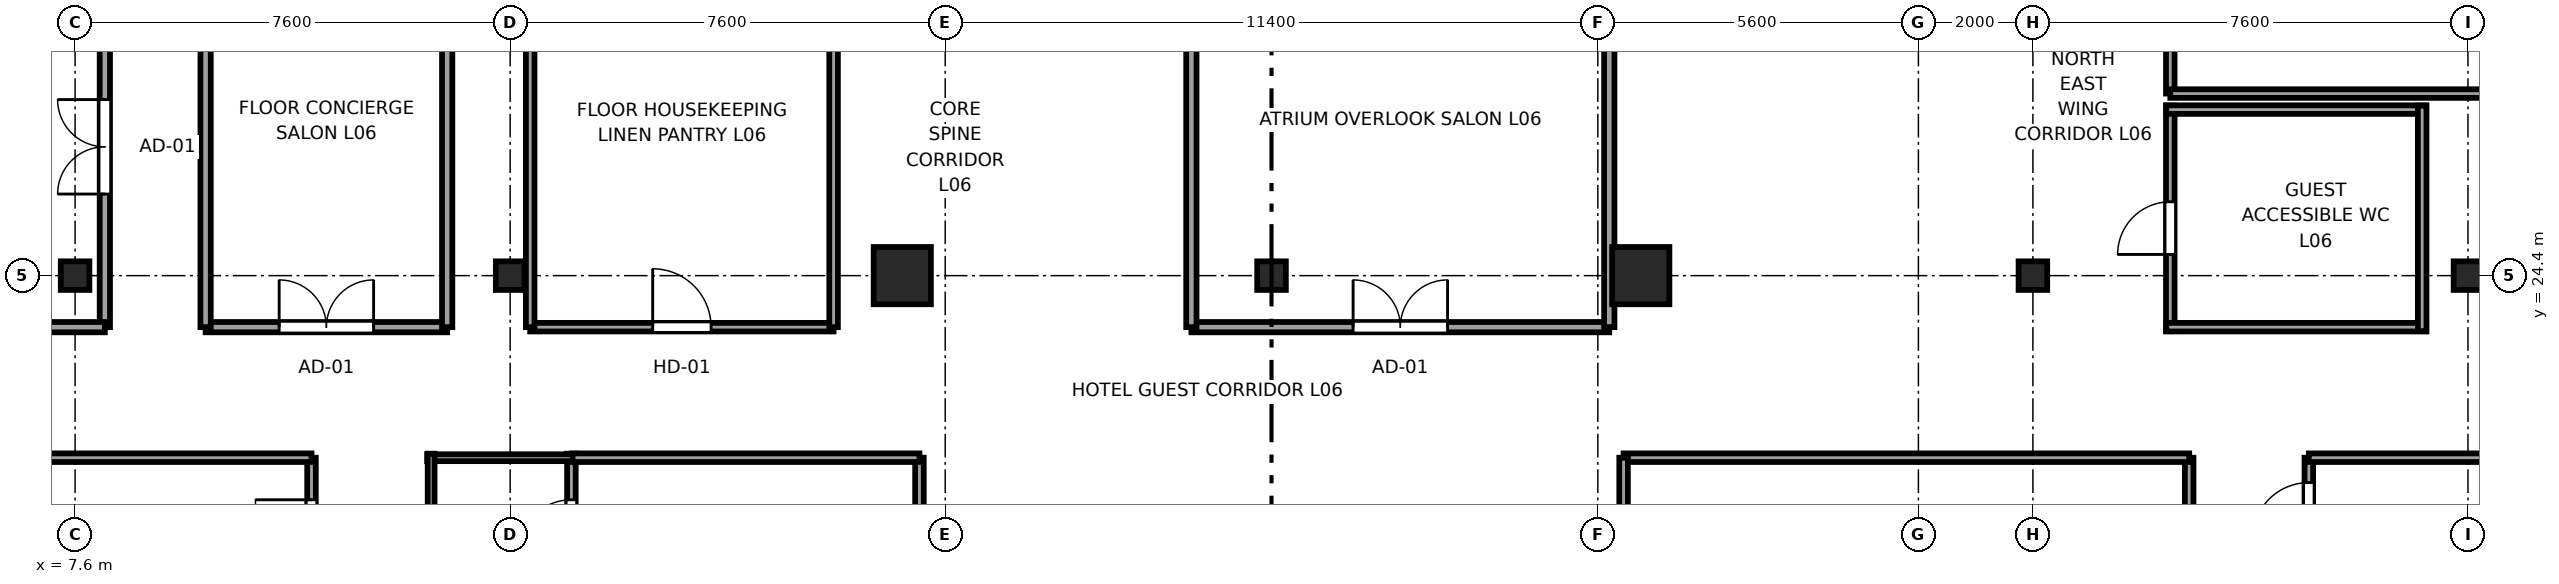
"""IFC4 building model, lengths in metres.
Left out: names, types, materials, properties, quantities, classifications, styles, units other than length and angle.
Written with IfcOpenShell. Run it as: python <this file> out.ifc"""

import sys

from ifc_helpers import new_model, si_unit, direction, frame, frame_2d, origin, origin_2d, place, context, subcontext, project, spatial, rectangle, i_section, extrude, source, transform, mapped, element, fill, save


model = new_model("IFC4")
c1 = context("Model", 3, precision=1e-05, world=origin(), true_north=direction((0.0, 1.0)))
c2 = subcontext(c1, "Body", "Model", "MODEL_VIEW")
j1 = project(units=[si_unit("LENGTHUNIT", "METRE"), si_unit("PLANEANGLEUNIT", "RADIAN")], contexts=[c1])
p1 = place(None, origin())
s1 = spatial("IfcSite", under=j1, at=p1, CompositionType="ELEMENT")
p2 = place(p1, origin())
s2 = spatial("IfcBuilding", under=s1, at=p2, CompositionType="ELEMENT")
p3 = place(p2, frame((0.0, 0.0, 32.0)))
s3 = spatial("IfcBuildingStorey", under=s2, at=p3, CompositionType="ELEMENT", Elevation=32.0)
m1 = source(origin(), c2, "Body", "SweptSolid", [
    extrude(i_section(OverallWidth=0.5, OverallDepth=0.5, WebThickness=0.028, FlangeThickness=0.045, at=origin_2d()), origin(), (0.0, 0.0, 1.0), 3.55),
])
for number, where, z_axis, x_axis in (
    (1, (7.6, 24.4, 0.0), (0.0, 0.0, 1.0), (1.0, 0.0, 0.0)),
    (2, (15.2, 24.4, 0.0), (0.0, 0.0, 1.0), (1.0, 0.0, 0.0)),
):
    element("IfcColumn", number, at=place(p3, frame(where, z_axis=z_axis, x_axis=x_axis)), inside=s3, PredefinedType="COLUMN", context=c2, shape_type="MappedRepresentation", body=[
        mapped(m1, transform((0.0, 0.0, 0.0), x_axis=(1.0, 0.0, 0.0), y_axis=(0.0, 1.0, 0.0), z_axis=(0.0, 0.0, 1.0), scale=1.0)),
    ])
m2 = source(origin(), c2, "Body", "SweptSolid", [
    extrude(rectangle(XDim=1.0, YDim=1.0, at=origin_2d()), origin(), (0.0, 0.0, 1.0), 3.55),
])
for number, where, z_axis, x_axis in (
    (3, (22.05, 24.4, 0.0), (0.0, 0.0, 1.0), (1.0, 0.0, 0.0)),
    (4, (34.95, 24.4, 0.0), (0.0, 0.0, 1.0), (1.0, 0.0, 0.0)),
):
    element("IfcColumn", number, at=place(p3, frame(where, z_axis=z_axis, x_axis=x_axis)), inside=s3, PredefinedType="COLUMN", context=c2, shape_type="MappedRepresentation", body=[
        mapped(m2, transform((0.0, 0.0, 0.0), x_axis=(1.0, 0.0, 0.0), y_axis=(0.0, 1.0, 0.0), z_axis=(0.0, 0.0, 1.0), scale=1.0)),
    ])
for number, where, z_axis, x_axis in (
    (5, (41.8, 24.4, 0.0), (0.0, 0.0, 1.0), (1.0, 0.0, 0.0)),
    (6, (49.4, 24.4, 0.0), (0.0, 0.0, 1.0), (1.0, 0.0, 0.0)),
    (7, (28.5, 24.4, 0.0), (0.0, 0.0, 1.0), (1.0, 0.0, 0.0)),
):
    element("IfcColumn", number, at=place(p3, frame(where, z_axis=z_axis, x_axis=x_axis)), inside=s3, PredefinedType="COLUMN", context=c2, shape_type="MappedRepresentation", body=[
        mapped(m1, transform((0.0, 0.0, 0.0), x_axis=(1.0, 0.0, 0.0), y_axis=(0.0, 1.0, 0.0), z_axis=(0.0, 0.0, 1.0), scale=1.0)),
    ])
p4 = place(p3, frame((16.27, 18.9, 0.0), z_axis=(0.0, 0.0, 1.0), x_axis=(0.0, 1.0, 0.0)))
e8 = element("IfcWall", 8, at=p4, inside=s3, PredefinedType="PARTITIONING", context=c2, shape_type="SweptSolid", body=[
    extrude(rectangle(XDim=2.39, YDim=0.15, at=frame_2d((1.195, 0.0))), origin(), (0.0, 0.0, 1.0), 3.37),
])
p5 = place(p4, frame((0.665, 0.0, 0.0)))
e9 = element("IfcOpeningElement", 9, at=p5, cuts=e8, PredefinedType="OPENING", context=c2, shape_type="SweptSolid", body=[
    extrude(rectangle(XDim=0.92, YDim=2.01, at=frame_2d((0.46, 1.005))), frame((0.0, 0.085, 0.0), z_axis=(0.0, -1.0, 0.0), x_axis=(1.0, 0.0, 0.0)), (0.0, 0.0, 1.0), 0.17),
])
p6 = place(p3, frame((13.75, 21.22, 0.0), z_axis=(0.0, 0.0, 1.0), x_axis=(1.0, 0.0, 0.0)))
e10 = element("IfcWall", 10, at=p6, inside=s3, PredefinedType="PLUMBINGWALL", context=c2, shape_type="SweptSolid", body=[
    extrude(rectangle(XDim=2.59, YDim=0.12, at=frame_2d((1.295, 0.0))), origin(), (0.0, 0.0, 1.0), 3.37),
])
p7 = place(p3, frame((13.82, 18.9, 0.0), z_axis=(0.0, 0.0, 1.0), x_axis=(0.0, 1.0, 0.0)))
e11 = element("IfcWall", 11, at=p7, inside=s3, PredefinedType="PLUMBINGWALL", context=c2, shape_type="SweptSolid", body=[
    extrude(rectangle(XDim=2.39, YDim=0.12, at=frame_2d((1.195, 0.0))), origin(), (0.0, 0.0, 1.0), 3.37),
])
p8 = place(p3, frame((11.73, 18.81, 0.0), z_axis=(0.0, 0.0, 1.0), x_axis=(0.0, 1.0, 0.0)))
e12 = element("IfcWall", 12, at=p8, inside=s3, PredefinedType="PARTITIONING", context=c2, shape_type="SweptSolid", body=[
    extrude(rectangle(XDim=2.41, YDim=0.15, at=frame_2d((1.205, 0.0))), origin(), (0.0, 0.0, 1.0), 3.37),
])
p9 = place(p8, frame((0.695, 0.0, 0.0)))
e13 = element("IfcOpeningElement", 13, at=p9, cuts=e12, PredefinedType="OPENING", context=c2, shape_type="SweptSolid", body=[
    extrude(rectangle(XDim=0.98, YDim=2.12, at=frame_2d((0.49, 1.06))), frame((0.0, 0.085, 0.0), z_axis=(0.0, -1.0, 0.0), x_axis=(1.0, 0.0, 0.0)), (0.0, 0.0, 1.0), 0.17),
])
p10 = place(p3, frame((0.405, 21.22, 0.0), z_axis=(0.0, 0.0, 1.0), x_axis=(1.0, 0.0, 0.0)))
e14 = element("IfcWall", 14, at=p10, inside=s3, PredefinedType="PARTITIONING", context=c2, shape_type="SweptSolid", body=[
    extrude(rectangle(XDim=11.325, YDim=0.15, at=frame_2d((5.663, 0.0))), origin(), (0.0, 0.0, 1.0), 3.37),
])
p11 = place(p3, frame((22.35, 14.48, 0.0), z_axis=(0.0, 0.0, 1.0), x_axis=(0.0, 1.0, 0.0)))
e15 = element("IfcWall", 15, at=p11, inside=s3, PredefinedType="PARTITIONING", context=c2, shape_type="SweptSolid", body=[
    extrude(rectangle(XDim=6.74, YDim=0.15, at=frame_2d((3.37, 0.0))), origin(), (0.0, 0.0, 1.0), 3.37),
])
p12 = place(p3, frame((16.29, 21.22, 0.0), z_axis=(0.0, 0.0, 1.0), x_axis=(1.0, 0.0, 0.0)))
e16 = element("IfcWall", 16, at=p12, inside=s3, PredefinedType="PARTITIONING", context=c2, shape_type="SweptSolid", body=[
    extrude(rectangle(XDim=6.06, YDim=0.15, at=frame_2d((3.03, 0.0))), origin(), (0.0, 0.0, 1.0), 3.37),
])
p13 = place(p3, frame((44.53, 16.61, 0.0), z_axis=(0.0, 0.0, 1.0), x_axis=(0.0, 1.0, 0.0)))
e17 = element("IfcWall", 17, at=p13, inside=s3, PredefinedType="PARTITIONING", context=c2, shape_type="SweptSolid", body=[
    extrude(rectangle(XDim=4.61, YDim=0.15, at=frame_2d((2.305, 0.0))), origin(), (0.0, 0.0, 1.0), 3.37),
])
p14 = place(p13, frame((1.795, 0.0, 0.0)))
e18 = element("IfcOpeningElement", 18, at=p14, cuts=e17, PredefinedType="OPENING", context=c2, shape_type="SweptSolid", body=[
    extrude(rectangle(XDim=0.98, YDim=2.12, at=frame_2d((0.49, 1.06))), frame((0.0, 0.085, 0.0), z_axis=(0.0, -1.0, 0.0), x_axis=(1.0, 0.0, 0.0)), (0.0, 0.0, 1.0), 0.17),
])
p15 = place(p3, frame((34.65, 21.22, 0.0), z_axis=(0.0, 0.0, 1.0), x_axis=(1.0, 0.0, 0.0)))
e19 = element("IfcWall", 19, at=p15, inside=s3, PredefinedType="PARTITIONING", context=c2, shape_type="SweptSolid", body=[
    extrude(rectangle(XDim=9.88, YDim=0.15, at=frame_2d((4.94, 0.0))), origin(), (0.0, 0.0, 1.0), 3.37),
])
p16 = place(p3, frame((34.65, 14.28, 0.0), z_axis=(0.0, 0.0, 1.0), x_axis=(0.0, 1.0, 0.0)))
e20 = element("IfcWall", 20, at=p16, inside=s3, PredefinedType="PARTITIONING", context=c2, shape_type="SweptSolid", body=[
    extrude(rectangle(XDim=6.94, YDim=0.15, at=frame_2d((3.47, 0.0))), origin(), (0.0, 0.0, 1.0), 3.37),
])
p17 = place(p3, frame((46.62, 19.41, 0.0), z_axis=(0.0, 0.0, 1.0), x_axis=(0.0, 1.0, 0.0)))
e21 = element("IfcWall", 21, at=p17, inside=s3, PredefinedType="PARTITIONING", context=c2, shape_type="SweptSolid", body=[
    extrude(rectangle(XDim=1.81, YDim=0.15, at=frame_2d((0.905, 0.0))), origin(), (0.0, 0.0, 1.0), 3.37),
])
p18 = place(p17, frame((0.395, 0.0, 0.0)))
e22 = element("IfcOpeningElement", 22, at=p18, cuts=e21, PredefinedType="OPENING", context=c2, shape_type="SweptSolid", body=[
    extrude(rectangle(XDim=0.98, YDim=2.12, at=frame_2d((0.49, 1.06))), frame((0.0, 0.085, 0.0), z_axis=(0.0, -1.0, 0.0), x_axis=(1.0, 0.0, 0.0)), (0.0, 0.0, 1.0), 0.17),
])
p19 = place(p3, frame((46.62, 21.22, 0.0), z_axis=(0.0, 0.0, 1.0), x_axis=(1.0, 0.0, 0.0)))
e23 = element("IfcWall", 23, at=p19, inside=s3, PredefinedType="PARTITIONING", context=c2, shape_type="SweptSolid", body=[
    extrude(rectangle(XDim=9.975, YDim=0.15, at=frame_2d((4.987, 0.0))), origin(), (0.0, 0.0, 1.0), 3.37),
])
p20 = place(p3, frame((8.12, 23.5, 0.0), z_axis=(0.0, 0.0, 1.0), x_axis=(0.0, 1.0, 0.0)))
e24 = element("IfcWall", 24, at=p20, inside=s3, PredefinedType="PARTITIONING", context=c2, shape_type="SweptSolid", body=[
    extrude(rectangle(XDim=5.2, YDim=0.18, at=frame_2d((2.6, 0.0))), origin(), (0.0, 0.0, 1.0), 3.37),
])
p21 = place(p20, frame((2.325, 0.0, 0.0)))
e25 = element("IfcOpeningElement", 25, at=p21, cuts=e24, PredefinedType="OPENING", context=c2, shape_type="SweptSolid", body=[
    extrude(rectangle(XDim=1.65, YDim=2.15, at=frame_2d((0.825, 1.075))), frame((0.0, 0.1, 0.0), z_axis=(0.0, -1.0, 0.0), x_axis=(1.0, 0.0, 0.0)), (0.0, 0.0, 1.0), 0.2),
])
p22 = place(p3, frame((0.405, 23.5, 0.0), z_axis=(0.0, 0.0, 1.0), x_axis=(1.0, 0.0, 0.0)))
e26 = element("IfcWall", 26, at=p22, inside=s3, PredefinedType="PARTITIONING", context=c2, shape_type="SweptSolid", body=[
    extrude(rectangle(XDim=7.715, YDim=0.18, at=frame_2d((3.857, 0.0))), origin(), (0.0, 0.0, 1.0), 3.37),
])
p23 = place(p3, frame((44.2, 23.43, 0.0), z_axis=(0.0, 0.0, 1.0), x_axis=(0.0, 1.0, 0.0)))
e27 = element("IfcWall", 27, at=p23, inside=s3, PredefinedType="PARTITIONING", context=c2, shape_type="SweptSolid", body=[
    extrude(rectangle(XDim=3.94, YDim=0.15, at=frame_2d((1.97, 0.0))), origin(), (0.0, 0.0, 1.0), 3.37),
])
p24 = place(p23, frame((1.34, 0.0, 0.0)))
e28 = element("IfcOpeningElement", 28, at=p24, cuts=e27, PredefinedType="OPENING", context=c2, shape_type="SweptSolid", body=[
    extrude(rectangle(XDim=0.92, YDim=2.01, at=frame_2d((0.46, 1.005))), frame((0.0, 0.085, 0.0), z_axis=(0.0, -1.0, 0.0), x_axis=(1.0, 0.0, 0.0)), (0.0, 0.0, 1.0), 0.17),
])
for number, where, z_axis, x_axis in (
    (29, (44.13, 23.5, 0.0), (0.0, 0.0, 1.0), (1.0, 0.0, 0.0)),
    (30, (44.13, 27.3, 0.0), (0.0, 0.0, 1.0), (1.0, 0.0, 0.0)),
):
    element("IfcWall", number, at=place(p3, frame(where, z_axis=z_axis, x_axis=x_axis)), inside=s3, PredefinedType="PARTITIONING", context=c2, shape_type="SweptSolid", body=[
        extrude(rectangle(XDim=4.54, YDim=0.15, at=frame_2d((2.27, 0.0))), origin(), (0.0, 0.0, 1.0), 3.37),
    ])
p25 = place(p3, frame((48.6, 23.43, 0.0), z_axis=(0.0, 0.0, 1.0), x_axis=(0.0, 1.0, 0.0)))
e31 = element("IfcWall", 31, at=p25, inside=s3, PredefinedType="PARTITIONING", context=c2, shape_type="SweptSolid", body=[
    extrude(rectangle(XDim=3.94, YDim=0.15, at=frame_2d((1.97, 0.0))), origin(), (0.0, 0.0, 1.0), 3.37),
])
p26 = place(p3, frame((44.2, 27.58, 0.0), z_axis=(0.0, 0.0, 1.0), x_axis=(0.0, 1.0, 0.0)))
e32 = element("IfcWall", 32, at=p26, inside=s3, PredefinedType="PARTITIONING", context=c2, shape_type="SweptSolid", body=[
    extrude(rectangle(XDim=4.58, YDim=0.15, at=frame_2d((2.29, 0.0))), origin(), (0.0, 0.0, 1.0), 3.37),
])
p27 = place(p26, frame((1.745, 0.0, 0.0)))
e33 = element("IfcOpeningElement", 33, at=p27, cuts=e32, PredefinedType="OPENING", context=c2, shape_type="SweptSolid", body=[
    extrude(rectangle(XDim=0.98, YDim=2.12, at=frame_2d((0.49, 1.06))), frame((0.0, 0.085, 0.0), z_axis=(0.0, -1.0, 0.0), x_axis=(1.0, 0.0, 0.0)), (0.0, 0.0, 1.0), 0.17),
])
p28 = place(p3, frame((44.2, 27.58, 0.0), z_axis=(0.0, 0.0, 1.0), x_axis=(1.0, 0.0, 0.0)))
e34 = element("IfcWall", 34, at=p28, inside=s3, PredefinedType="PARTITIONING", context=c2, shape_type="SweptSolid", body=[
    extrude(rectangle(XDim=10.03, YDim=0.15, at=frame_2d((5.015, 0.0))), origin(), (0.0, 0.0, 1.0), 3.37),
])
p29 = place(p3, frame((9.88, 23.5, 0.0), z_axis=(0.0, 0.0, 1.0), x_axis=(1.0, 0.0, 0.0)))
e35 = element("IfcWall", 35, at=p29, inside=s3, PredefinedType="PARTITIONING", context=c2, shape_type="SweptSolid", body=[
    extrude(rectangle(XDim=4.22, YDim=0.18, at=frame_2d((2.11, 0.0))), origin(), (0.0, 0.0, 1.0), 3.37),
])
p30 = place(p29, frame((1.285, 0.0, 0.0)))
e36 = element("IfcOpeningElement", 36, at=p30, cuts=e35, PredefinedType="OPENING", context=c2, shape_type="SweptSolid", body=[
    extrude(rectangle(XDim=1.65, YDim=2.15, at=frame_2d((0.825, 1.075))), frame((0.0, 0.1, 0.0), z_axis=(0.0, -1.0, 0.0), x_axis=(1.0, 0.0, 0.0)), (0.0, 0.0, 1.0), 0.2),
])
for number, where, z_axis, x_axis in (
    (37, (9.88, 23.5, 0.0), (0.0, 0.0, 1.0), (0.0, 1.0, 0.0)),
    (38, (14.1, 23.5, 0.0), (0.0, 0.0, 1.0), (0.0, 1.0, 0.0)),
):
    element("IfcWall", number, at=place(p3, frame(where, z_axis=z_axis, x_axis=x_axis)), inside=s3, PredefinedType="PARTITIONING", context=c2, shape_type="SweptSolid", body=[
        extrude(rectangle(XDim=6.25, YDim=0.18, at=frame_2d((3.125, 0.0))), origin(), (0.0, 0.0, 1.0), 3.37),
    ])
p31 = place(p3, frame((27.1, 23.5, 0.0), z_axis=(0.0, 0.0, 1.0), x_axis=(1.0, 0.0, 0.0)))
e39 = element("IfcWall", 39, at=p31, inside=s3, PredefinedType="PARTITIONING", context=c2, shape_type="SweptSolid", body=[
    extrude(rectangle(XDim=7.3, YDim=0.18, at=frame_2d((3.65, 0.0))), origin(), (0.0, 0.0, 1.0), 3.37),
])
p32 = place(p31, frame((2.825, 0.0, 0.0)))
e40 = element("IfcOpeningElement", 40, at=p32, cuts=e39, PredefinedType="OPENING", context=c2, shape_type="SweptSolid", body=[
    extrude(rectangle(XDim=1.65, YDim=2.15, at=frame_2d((0.825, 1.075))), frame((0.0, 0.1, 0.0), z_axis=(0.0, -1.0, 0.0), x_axis=(1.0, 0.0, 0.0)), (0.0, 0.0, 1.0), 0.2),
])
for number, where, z_axis, x_axis in (
    (41, (27.1, 23.5, 0.0), (0.0, 0.0, 1.0), (0.0, 1.0, 0.0)),
    (42, (34.4, 23.5, 0.0), (0.0, 0.0, 1.0), (0.0, 1.0, 0.0)),
):
    element("IfcWall", number, at=place(p3, frame(where, z_axis=z_axis, x_axis=x_axis)), inside=s3, PredefinedType="PARTITIONING", context=c2, shape_type="SweptSolid", body=[
        extrude(rectangle(XDim=6.3, YDim=0.18, at=frame_2d((3.15, 0.0))), origin(), (0.0, 0.0, 1.0), 3.37),
    ])
p33 = place(p3, frame((15.55, 23.5, 0.0), z_axis=(0.0, 0.0, 1.0), x_axis=(1.0, 0.0, 0.0)))
e43 = element("IfcWall", 43, at=p33, inside=s3, PredefinedType="PARTITIONING", context=c2, shape_type="SweptSolid", body=[
    extrude(rectangle(XDim=5.3, YDim=0.15, at=frame_2d((2.65, 0.0))), origin(), (0.0, 0.0, 1.0), 3.37),
])
p34 = place(p33, frame((2.14, 0.0, 0.0)))
e44 = element("IfcOpeningElement", 44, at=p34, cuts=e43, PredefinedType="OPENING", context=c2, shape_type="SweptSolid", body=[
    extrude(rectangle(XDim=1.02, YDim=2.03, at=frame_2d((0.51, 1.015))), frame((0.0, 0.085, 0.0), z_axis=(0.0, -1.0, 0.0), x_axis=(1.0, 0.0, 0.0)), (0.0, 0.0, 1.0), 0.17),
])
for number, where, z_axis, x_axis in (
    (45, (15.55, 23.5, 0.0), (0.0, 0.0, 1.0), (0.0, 1.0, 0.0)),
    (46, (20.85, 23.5, 0.0), (0.0, 0.0, 1.0), (0.0, 1.0, 0.0)),
):
    element("IfcWall", number, at=place(p3, frame(where, z_axis=z_axis, x_axis=x_axis)), inside=s3, PredefinedType="PARTITIONING", context=c2, shape_type="SweptSolid", body=[
        extrude(rectangle(XDim=6.3, YDim=0.15, at=frame_2d((3.15, 0.0))), origin(), (0.0, 0.0, 1.0), 3.37),
    ])
m3 = source(origin(), c2, "Body", "SweptSolid", [
    extrude(rectangle(XDim=0.92, YDim=2.01, at=frame_2d((0.46, 1.005))), frame((0.0, 0.025, 0.0), z_axis=(0.0, -1.0, 0.0), x_axis=(1.0, 0.0, 0.0)), (0.0, 0.0, 1.0), 0.05),
])
p35 = place(p5, origin())
e47 = element("IfcDoor", 47, at=p35, inside=s3, OperationType="SINGLE_SWING_LEFT", PredefinedType="DOOR", context=c2, shape_type="MappedRepresentation", body=[
    mapped(m3, transform((0.0, 0.0, 0.0), x_axis=(1.0, 0.0, 0.0), y_axis=(0.0, 1.0, 0.0), z_axis=(0.0, 0.0, 1.0), scale=1.0)),
])
fill(e9, e47)
m4 = source(origin(), c2, "Body", "SweptSolid", [
    extrude(rectangle(XDim=0.98, YDim=2.12, at=frame_2d((0.49, 1.06))), frame((0.0, 0.025, 0.0), z_axis=(0.0, -1.0, 0.0), x_axis=(1.0, 0.0, 0.0)), (0.0, 0.0, 1.0), 0.05),
])
p36 = place(p9, origin())
e48 = element("IfcDoor", 48, at=p36, inside=s3, OperationType="SINGLE_SWING_RIGHT", PredefinedType="DOOR", context=c2, shape_type="MappedRepresentation", body=[
    mapped(m4, transform((0.0, 0.0, 0.0), x_axis=(1.0, 0.0, 0.0), y_axis=(0.0, 1.0, 0.0), z_axis=(0.0, 0.0, 1.0), scale=1.0)),
])
fill(e13, e48)
p37 = place(p18, origin())
e49 = element("IfcDoor", 49, at=p37, inside=s3, OperationType="SINGLE_SWING_LEFT", PredefinedType="DOOR", context=c2, shape_type="MappedRepresentation", body=[
    mapped(m4, transform((0.0, 0.0, 0.0), x_axis=(1.0, 0.0, 0.0), y_axis=(0.0, 1.0, 0.0), z_axis=(0.0, 0.0, 1.0), scale=1.0)),
])
fill(e22, e49)
m5 = source(origin(), c2, "Body", "SweptSolid", [
    extrude(rectangle(XDim=1.65, YDim=2.15, at=frame_2d((0.825, 1.075))), frame((0.0, 0.025, 0.0), z_axis=(0.0, -1.0, 0.0), x_axis=(1.0, 0.0, 0.0)), (0.0, 0.0, 1.0), 0.05),
])
p38 = place(p21, origin())
e50 = element("IfcDoor", 50, at=p38, inside=s3, OperationType="DOUBLE_DOOR_SINGLE_SWING", PredefinedType="DOOR", context=c2, shape_type="MappedRepresentation", body=[
    mapped(m5, transform((0.0, 0.0, 0.0), x_axis=(1.0, 0.0, 0.0), y_axis=(0.0, 1.0, 0.0), z_axis=(0.0, 0.0, 1.0), scale=1.0)),
])
fill(e25, e50)
p39 = place(p24, origin())
e51 = element("IfcDoor", 51, at=p39, inside=s3, OperationType="SINGLE_SWING_LEFT", PredefinedType="DOOR", context=c2, shape_type="MappedRepresentation", body=[
    mapped(m3, transform((0.0, 0.0, 0.0), x_axis=(1.0, 0.0, 0.0), y_axis=(0.0, 1.0, 0.0), z_axis=(0.0, 0.0, 1.0), scale=1.0)),
])
fill(e28, e51)
p40 = place(p30, origin())
e52 = element("IfcDoor", 52, at=p40, inside=s3, OperationType="DOUBLE_DOOR_SINGLE_SWING", PredefinedType="DOOR", context=c2, shape_type="MappedRepresentation", body=[
    mapped(m5, transform((0.0, 0.0, 0.0), x_axis=(1.0, 0.0, 0.0), y_axis=(0.0, 1.0, 0.0), z_axis=(0.0, 0.0, 1.0), scale=1.0)),
])
fill(e36, e52)
p41 = place(p32, origin())
e53 = element("IfcDoor", 53, at=p41, inside=s3, OperationType="DOUBLE_DOOR_SINGLE_SWING", PredefinedType="DOOR", context=c2, shape_type="MappedRepresentation", body=[
    mapped(m5, transform((0.0, 0.0, 0.0), x_axis=(1.0, 0.0, 0.0), y_axis=(0.0, 1.0, 0.0), z_axis=(0.0, 0.0, 1.0), scale=1.0)),
])
fill(e40, e53)
m6 = source(origin(), c2, "Body", "SweptSolid", [
    extrude(rectangle(XDim=1.02, YDim=2.03, at=frame_2d((0.51, 1.015))), frame((0.0, 0.025, 0.0), z_axis=(0.0, -1.0, 0.0), x_axis=(1.0, 0.0, 0.0)), (0.0, 0.0, 1.0), 0.05),
])
p42 = place(p34, origin())
e54 = element("IfcDoor", 54, at=p42, inside=s3, OperationType="SINGLE_SWING_LEFT", PredefinedType="DOOR", context=c2, shape_type="MappedRepresentation", body=[
    mapped(m6, transform((0.0, 0.0, 0.0), x_axis=(1.0, 0.0, 0.0), y_axis=(0.0, 1.0, 0.0), z_axis=(0.0, 0.0, 1.0), scale=1.0)),
])
fill(e44, e54)
save(model, sys.argv[1])
